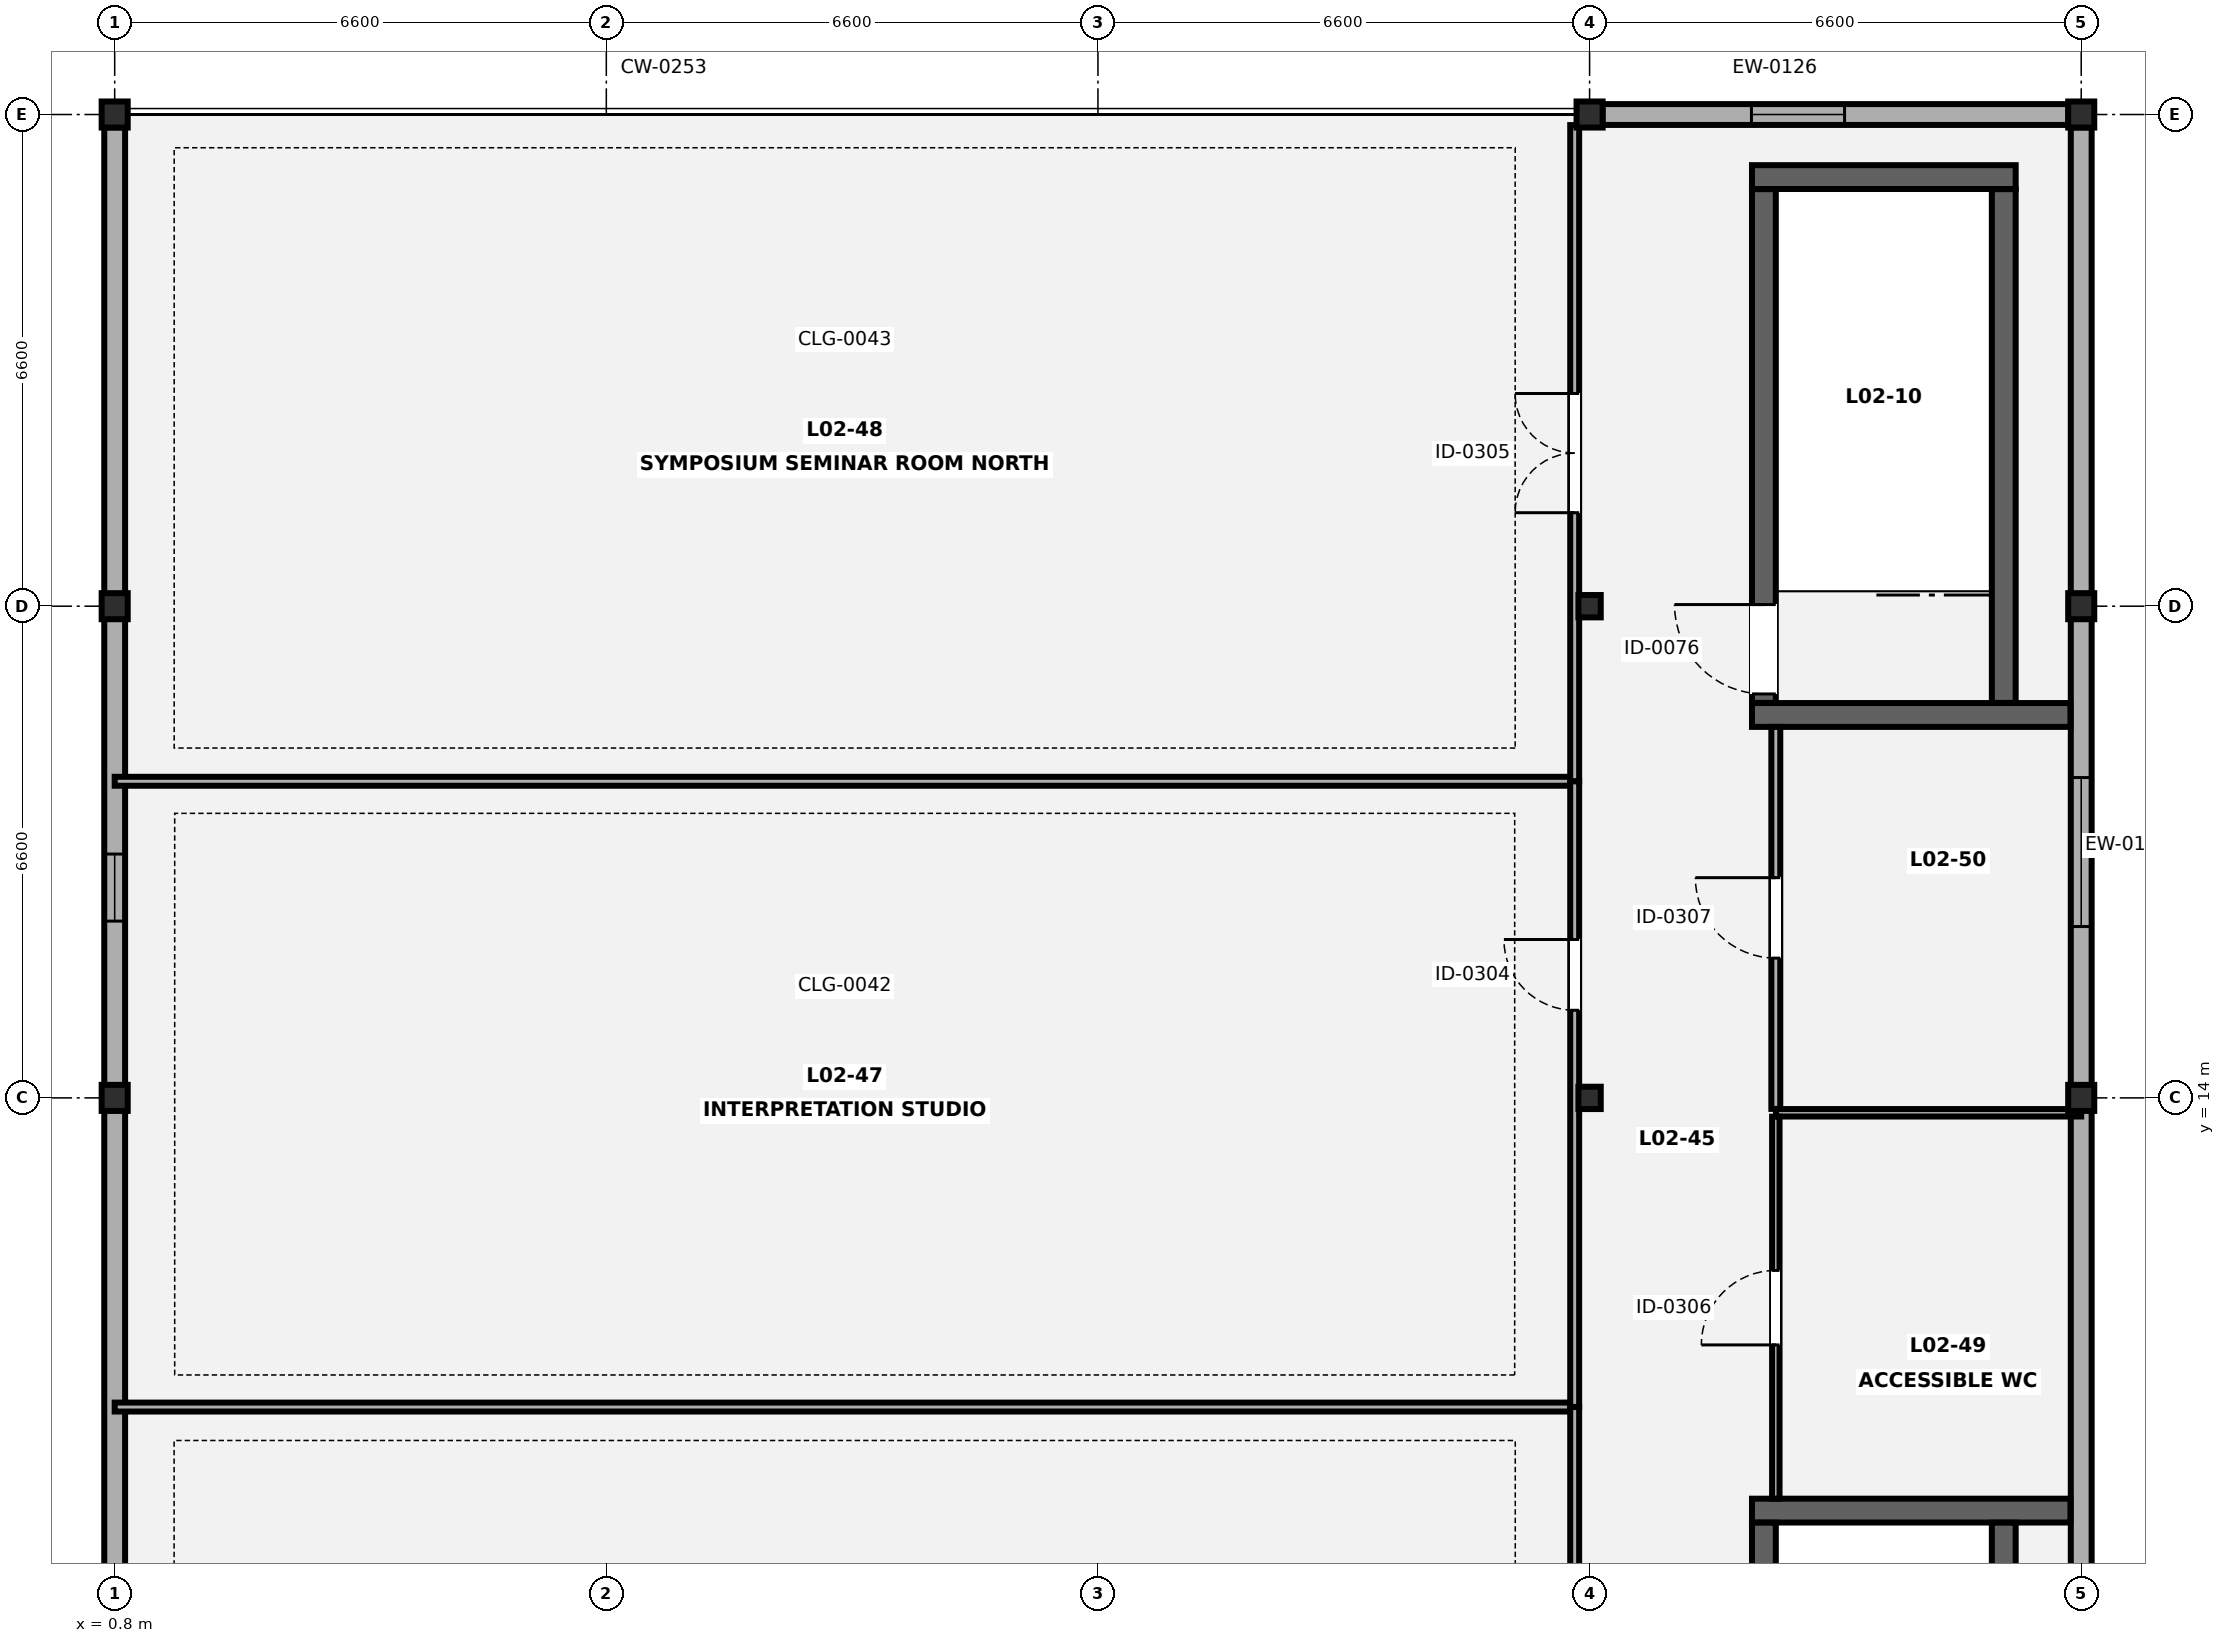
"""IFC4 building model, lengths in metres.
Left out: names, types, materials, properties, quantities, classifications, styles, units other than length and angle.
Written with IfcOpenShell. Run it as: python <this file> out.ifc"""

import sys

from ifc_helpers import new_model, si_unit, direction, frame, frame_2d, origin, origin_2d, place, context, subcontext, project, spatial, rectangle, hollow_rectangle, i_section, extrude, element, fill, save


model = new_model("IFC4")
c1 = context("Model", 3, precision=1e-05, world=origin(), true_north=direction((0.0, 1.0)))
c2 = subcontext(c1, "Body", "Model", "MODEL_VIEW")
j1 = project(units=[si_unit("LENGTHUNIT", "METRE"), si_unit("PLANEANGLEUNIT", "RADIAN")], contexts=[c1])
p1 = place(None, origin())
s1 = spatial("IfcSite", under=j1, at=p1, CompositionType="ELEMENT")
p2 = place(p1, origin())
s2 = spatial("IfcBuilding", under=s1, at=p2, CompositionType="ELEMENT")
p3 = place(p2, frame((0.0, 0.0, 9.1)))
s3 = spatial("IfcBuildingStorey", under=s2, at=p3, CompositionType="ELEMENT", Elevation=9.1)
for number, where, z_axis, x_axis in (
    (1, (0.8, 14.0, 0.0), (0.0, 0.0, 1.0), (1.0, 0.0, 0.0)),
    (2, (0.8, 20.6, 0.0), (0.0, 0.0, 1.0), (1.0, 0.0, 0.0)),
    (3, (0.8, 27.2, 0.0), (0.0, 0.0, 1.0), (1.0, 0.0, 0.0)),
):
    element("IfcColumn", number, at=place(p3, frame(where, z_axis=z_axis, x_axis=x_axis)), inside=s3, PredefinedType="COLUMN", context=c2, shape_type="SweptSolid", body=[
        extrude(i_section(OverallWidth=0.35, OverallDepth=0.35, WebThickness=0.02, FlangeThickness=0.032, FilletRadius=0.016, at=origin_2d()), origin(), (0.0, 0.0, 1.0), 3.95),
    ])
for number, where, z_axis, x_axis in (
    (4, (20.6, 14.0, 0.0), (0.0, 0.0, 1.0), (1.0, 0.0, 0.0)),
    (5, (20.6, 20.6, 0.0), (0.0, 0.0, 1.0), (1.0, 0.0, 0.0)),
):
    element("IfcColumn", number, at=place(p3, frame(where, z_axis=z_axis, x_axis=x_axis)), inside=s3, PredefinedType="COLUMN", context=c2, shape_type="SweptSolid", body=[
        extrude(hollow_rectangle(XDim=0.3, YDim=0.3, WallThickness=0.012, at=origin_2d()), origin(), (0.0, 0.0, 1.0), 3.95),
    ])
for number, where, z_axis, x_axis in (
    (6, (20.6, 27.2, 0.0), (0.0, 0.0, 1.0), (1.0, 0.0, 0.0)),
    (7, (27.2, 14.0, 0.0), (0.0, 0.0, 1.0), (1.0, 0.0, 0.0)),
    (8, (27.2, 20.6, 0.0), (0.0, 0.0, 1.0), (1.0, 0.0, 0.0)),
    (9, (27.2, 27.2, 0.0), (0.0, 0.0, 1.0), (1.0, 0.0, 0.0)),
):
    element("IfcColumn", number, at=place(p3, frame(where, z_axis=z_axis, x_axis=x_axis)), inside=s3, PredefinedType="COLUMN", context=c2, shape_type="SweptSolid", body=[
        extrude(i_section(OverallWidth=0.35, OverallDepth=0.35, WebThickness=0.02, FlangeThickness=0.032, FilletRadius=0.016, at=origin_2d()), origin(), (0.0, 0.0, 1.0), 3.95),
    ])
p4 = place(p3, frame((0.8, 0.973, 0.0), z_axis=(0.0, 0.0, 1.0), x_axis=(0.0, 1.0, 0.0)))
e10 = element("IfcWall", 10, at=p4, inside=s3, PredefinedType="SOLIDWALL", context=c2, shape_type="SweptSolid", body=[
    extrude(rectangle(XDim=26.054, YDim=0.28, at=frame_2d((13.027, 0.0))), origin(), (0.0, 0.0, 1.0), 3.445),
])
p5 = place(p4, frame((2.3, 0.0, 0.85)))
e11 = element("IfcOpeningElement", 11, at=p5, cuts=e10, PredefinedType="OPENING", context=c2, shape_type="SweptSolid", body=[
    extrude(rectangle(XDim=1.65, YDim=1.25, at=frame_2d((0.825, 0.625))), frame((0.0, 0.15, 0.0), z_axis=(0.0, -1.0, 0.0), x_axis=(1.0, 0.0, 0.0)), (0.0, 0.0, 1.0), 0.3),
])
p6 = place(p4, frame((15.4, 0.0, 0.85)))
e12 = element("IfcOpeningElement", 12, at=p6, cuts=e10, PredefinedType="OPENING", context=c2, shape_type="SweptSolid", body=[
    extrude(rectangle(XDim=0.9, YDim=1.35, at=frame_2d((0.45, 0.675))), frame((0.0, 0.15, 0.0), z_axis=(0.0, -1.0, 0.0), x_axis=(1.0, 0.0, 0.0)), (0.0, 0.0, 1.0), 0.3),
])
p7 = place(p3, frame((20.773, 27.2, 0.0), z_axis=(0.0, 0.0, 1.0), x_axis=(1.0, 0.0, 0.0)))
e13 = element("IfcWall", 13, at=p7, inside=s3, PredefinedType="SOLIDWALL", context=c2, shape_type="SweptSolid", body=[
    extrude(rectangle(XDim=6.254, YDim=0.28, at=frame_2d((3.127, 0.0))), origin(), (0.0, 0.0, 1.0), 3.505),
])
p8 = place(p7, frame((2.0, 0.0, 0.85)))
e14 = element("IfcOpeningElement", 14, at=p8, cuts=e13, PredefinedType="OPENING", context=c2, shape_type="SweptSolid", body=[
    extrude(rectangle(XDim=1.25, YDim=1.4, at=frame_2d((0.625, 0.7))), frame((0.0, 0.15, 0.0), z_axis=(0.0, -1.0, 0.0), x_axis=(1.0, 0.0, 0.0)), (0.0, 0.0, 1.0), 0.3),
])
p9 = place(p3, frame((27.2, 27.027, 0.0), z_axis=(0.0, 0.0, 1.0), x_axis=(0.0, -1.0, 0.0)))
e15 = element("IfcWall", 15, at=p9, inside=s3, PredefinedType="SOLIDWALL", context=c2, shape_type="SweptSolid", body=[
    extrude(rectangle(XDim=26.054, YDim=0.28, at=frame_2d((13.027, 0.0))), origin(), (0.0, 0.0, 1.0), 3.445),
])
p10 = place(p9, frame((8.727, 0.0, 0.85)))
e16 = element("IfcOpeningElement", 16, at=p10, cuts=e15, PredefinedType="OPENING", context=c2, shape_type="SweptSolid", body=[
    extrude(rectangle(XDim=2.0, YDim=1.4, at=frame_2d((1.0, 0.7))), frame((0.0, 0.15, 0.0), z_axis=(0.0, -1.0, 0.0), x_axis=(1.0, 0.0, 0.0)), (0.0, 0.0, 1.0), 0.3),
])
p11 = place(p3, frame((22.78, 8.46, 0.0), z_axis=(0.0, 0.0, 1.0), x_axis=(1.0, 0.0, 0.0)))
e17 = element("IfcWall", 17, at=p11, inside=s3, PredefinedType="SHEAR", context=c2, shape_type="SweptSolid", body=[
    extrude(rectangle(XDim=4.275, YDim=0.32, at=frame_2d((2.137, 0.0))), origin(), (0.0, 0.0, 1.0), 4.0),
])
p12 = place(p3, frame((22.94, 1.402, 0.0), z_axis=(0.0, 0.0, 1.0), x_axis=(0.0, 1.0, 0.0)))
e18 = element("IfcWall", 18, at=p12, inside=s3, PredefinedType="SHEAR", context=c2, shape_type="SweptSolid", body=[
    extrude(rectangle(XDim=6.896, YDim=0.32, at=frame_2d((3.448, 0.0))), origin(), (0.0, 0.0, 1.0), 4.0),
])
p13 = place(p12, frame((0.12, 0.0, 0.0)))
e19 = element("IfcOpeningElement", 19, at=p13, cuts=e18, PredefinedType="OPENING", context=c2, shape_type="SweptSolid", body=[
    extrude(rectangle(XDim=1.2, YDim=2.15, at=frame_2d((0.6, 1.075))), frame((0.0, 0.17, 0.0), z_axis=(0.0, -1.0, 0.0), x_axis=(1.0, 0.0, 0.0)), (0.0, 0.0, 1.0), 0.34),
])
p14 = place(p3, frame((26.16, 1.402, 0.0), z_axis=(0.0, 0.0, 1.0), x_axis=(0.0, 1.0, 0.0)))
e20 = element("IfcWall", 20, at=p14, inside=s3, PredefinedType="SHEAR", context=c2, shape_type="SweptSolid", body=[
    extrude(rectangle(XDim=6.896, YDim=0.32, at=frame_2d((3.448, 0.0))), origin(), (0.0, 0.0, 1.0), 4.0),
])
p15 = place(p3, frame((22.78, 19.14, 0.0), z_axis=(0.0, 0.0, 1.0), x_axis=(1.0, 0.0, 0.0)))
e21 = element("IfcWall", 21, at=p15, inside=s3, PredefinedType="SHEAR", context=c2, shape_type="SweptSolid", body=[
    extrude(rectangle(XDim=4.275, YDim=0.32, at=frame_2d((2.137, 0.0))), origin(), (0.0, 0.0, 1.0), 4.0),
])
p16 = place(p3, frame((22.78, 26.36, 0.0), z_axis=(0.0, 0.0, 1.0), x_axis=(1.0, 0.0, 0.0)))
e22 = element("IfcWall", 22, at=p16, inside=s3, PredefinedType="SHEAR", context=c2, shape_type="SweptSolid", body=[
    extrude(rectangle(XDim=3.54, YDim=0.32, at=frame_2d((1.77, 0.0))), origin(), (0.0, 0.0, 1.0), 4.0),
])
p17 = place(p3, frame((22.94, 19.302, 0.0), z_axis=(0.0, 0.0, 1.0), x_axis=(0.0, 1.0, 0.0)))
e23 = element("IfcWall", 23, at=p17, inside=s3, PredefinedType="SHEAR", context=c2, shape_type="SweptSolid", body=[
    extrude(rectangle(XDim=6.896, YDim=0.32, at=frame_2d((3.448, 0.0))), origin(), (0.0, 0.0, 1.0), 4.0),
])
p18 = place(p17, frame((0.12, 0.0, 0.0)))
e24 = element("IfcOpeningElement", 24, at=p18, cuts=e23, PredefinedType="OPENING", context=c2, shape_type="SweptSolid", body=[
    extrude(rectangle(XDim=1.2, YDim=2.15, at=frame_2d((0.6, 1.075))), frame((0.0, 0.17, 0.0), z_axis=(0.0, -1.0, 0.0), x_axis=(1.0, 0.0, 0.0)), (0.0, 0.0, 1.0), 0.34),
])
p19 = place(p3, frame((26.16, 19.302, 0.0), z_axis=(0.0, 0.0, 1.0), x_axis=(0.0, 1.0, 0.0)))
e25 = element("IfcWall", 25, at=p19, inside=s3, PredefinedType="SHEAR", context=c2, shape_type="SweptSolid", body=[
    extrude(rectangle(XDim=6.896, YDim=0.32, at=frame_2d((3.448, 0.0))), origin(), (0.0, 0.0, 1.0), 4.0),
])
p20 = place(p3, frame((0.8, 9.85, 0.0), z_axis=(0.0, 0.0, 1.0), x_axis=(1.0, 0.0, 0.0)))
e26 = element("IfcWall", 26, at=p20, inside=s3, PredefinedType="PARTITIONING", context=c2, shape_type="SweptSolid", body=[
    extrude(rectangle(XDim=19.6, YDim=0.12, at=frame_2d((9.8, 0.0))), origin(), (0.0, 0.0, 1.0), 3.98),
])
p21 = place(p3, frame((20.4, 0.8, 0.0), z_axis=(0.0, 0.0, 1.0), x_axis=(0.0, 1.0, 0.0)))
e27 = element("IfcWall", 27, at=p21, inside=s3, PredefinedType="PARTITIONING", context=c2, shape_type="SweptSolid", body=[
    extrude(rectangle(XDim=9.05, YDim=0.12, at=frame_2d((4.525, 0.0))), origin(), (0.0, 0.0, 1.0), 3.445),
])
p22 = place(p21, frame((3.725, 0.0, 0.0)))
e28 = element("IfcOpeningElement", 28, at=p22, cuts=e27, PredefinedType="OPENING", context=c2, shape_type="SweptSolid", body=[
    extrude(rectangle(XDim=1.6, YDim=2.18, at=frame_2d((0.8, 1.09))), frame((0.0, 0.07, 0.0), z_axis=(0.0, -1.0, 0.0), x_axis=(1.0, 0.0, 0.0)), (0.0, 0.0, 1.0), 0.14),
])
p23 = place(p3, frame((0.8, 18.25, 0.0), z_axis=(0.0, 0.0, 1.0), x_axis=(1.0, 0.0, 0.0)))
e29 = element("IfcWall", 29, at=p23, inside=s3, PredefinedType="PARTITIONING", context=c2, shape_type="SweptSolid", body=[
    extrude(rectangle(XDim=19.6, YDim=0.12, at=frame_2d((9.8, 0.0))), origin(), (0.0, 0.0, 1.0), 3.98),
])
p24 = place(p3, frame((20.4, 9.852, 0.0), z_axis=(0.0, 0.0, 1.0), x_axis=(0.0, 1.0, 0.0)))
e30 = element("IfcWall", 30, at=p24, inside=s3, PredefinedType="PARTITIONING", context=c2, shape_type="SweptSolid", body=[
    extrude(rectangle(XDim=8.398, YDim=0.12, at=frame_2d((4.199, 0.0))), origin(), (0.0, 0.0, 1.0), 3.445),
])
p25 = place(p24, frame((5.324, 0.0, 0.0)))
e31 = element("IfcOpeningElement", 31, at=p25, cuts=e30, PredefinedType="OPENING", context=c2, shape_type="SweptSolid", body=[
    extrude(rectangle(XDim=0.95, YDim=2.1, at=frame_2d((0.475, 1.05))), frame((0.0, 0.07, 0.0), z_axis=(0.0, -1.0, 0.0), x_axis=(1.0, 0.0, 0.0)), (0.0, 0.0, 1.0), 0.14),
])
p26 = place(p3, frame((20.4, 18.252, 0.0), z_axis=(0.0, 0.0, 1.0), x_axis=(0.0, 1.0, 0.0)))
e32 = element("IfcWall", 32, at=p26, inside=s3, PredefinedType="PARTITIONING", context=c2, shape_type="SweptSolid", body=[
    extrude(rectangle(XDim=8.806, YDim=0.12, at=frame_2d((4.403, 0.0))), origin(), (0.0, 0.0, 1.0), 3.445),
])
p27 = place(p26, frame((3.603, 0.0, 0.0)))
e33 = element("IfcOpeningElement", 33, at=p27, cuts=e32, PredefinedType="OPENING", context=c2, shape_type="SweptSolid", body=[
    extrude(rectangle(XDim=1.6, YDim=2.18, at=frame_2d((0.8, 1.09))), frame((0.0, 0.07, 0.0), z_axis=(0.0, -1.0, 0.0), x_axis=(1.0, 0.0, 0.0)), (0.0, 0.0, 1.0), 0.14),
])
p28 = place(p3, frame((23.102, 13.8, 0.0), z_axis=(0.0, 0.0, 1.0), x_axis=(1.0, 0.0, 0.0)))
e34 = element("IfcWall", 34, at=p28, inside=s3, PredefinedType="PARTITIONING", context=c2, shape_type="SweptSolid", body=[
    extrude(rectangle(XDim=4.098, YDim=0.1, at=frame_2d((2.049, 0.0))), origin(), (0.0, 0.0, 1.0), 2.997),
])
p29 = place(p3, frame((23.1, 8.62, 0.0), z_axis=(0.0, 0.0, 1.0), x_axis=(0.0, 1.0, 0.0)))
e35 = element("IfcWall", 35, at=p29, inside=s3, PredefinedType="PARTITIONING", context=c2, shape_type="SweptSolid", body=[
    extrude(rectangle(XDim=5.128, YDim=0.1, at=frame_2d((2.564, 0.0))), origin(), (0.0, 0.0, 1.0), 3.98),
])
p30 = place(p29, frame((2.064, 0.0, 0.0)))
e36 = element("IfcOpeningElement", 36, at=p30, cuts=e35, PredefinedType="OPENING", context=c2, shape_type="SweptSolid", body=[
    extrude(rectangle(XDim=1.0, YDim=2.1, at=frame_2d((0.5, 1.05))), frame((0.0, 0.06, 0.0), z_axis=(0.0, -1.0, 0.0), x_axis=(1.0, 0.0, 0.0)), (0.0, 0.0, 1.0), 0.12),
])
p31 = place(p3, frame((23.1, 13.852, 0.0), z_axis=(0.0, 0.0, 1.0), x_axis=(0.0, 1.0, 0.0)))
e37 = element("IfcWall", 37, at=p31, inside=s3, PredefinedType="PARTITIONING", context=c2, shape_type="SweptSolid", body=[
    extrude(rectangle(XDim=5.128, YDim=0.12, at=frame_2d((2.564, 0.0))), origin(), (0.0, 0.0, 1.0), 3.98),
])
p32 = place(p31, frame((2.024, 0.0, 0.0)))
e38 = element("IfcOpeningElement", 38, at=p32, cuts=e37, PredefinedType="OPENING", context=c2, shape_type="SweptSolid", body=[
    extrude(rectangle(XDim=1.08, YDim=2.12, at=frame_2d((0.54, 1.06))), frame((0.0, 0.07, 0.0), z_axis=(0.0, -1.0, 0.0), x_axis=(1.0, 0.0, 0.0)), (0.0, 0.0, 1.0), 0.14),
])
p33 = place(p6, origin())
e39 = element("IfcWindow", 39, at=p33, inside=s3, PartitioningType="SINGLE_PANEL", PredefinedType="WINDOW", context=c2, shape_type="SweptSolid", body=[
    extrude(rectangle(XDim=0.9, YDim=1.35, at=frame_2d((0.45, 0.675))), frame((0.0, 0.03, 0.0), z_axis=(0.0, -1.0, 0.0), x_axis=(1.0, 0.0, 0.0)), (0.0, 0.0, 1.0), 0.06),
])
fill(e12, e39)
p34 = place(p8, origin())
e40 = element("IfcWindow", 40, at=p34, inside=s3, PartitioningType="SINGLE_PANEL", PredefinedType="WINDOW", context=c2, shape_type="SweptSolid", body=[
    extrude(rectangle(XDim=1.25, YDim=1.4, at=frame_2d((0.625, 0.7))), frame((0.0, 0.03, 0.0), z_axis=(0.0, -1.0, 0.0), x_axis=(1.0, 0.0, 0.0)), (0.0, 0.0, 1.0), 0.06),
])
fill(e14, e40)
p35 = place(p10, origin())
e41 = element("IfcWindow", 41, at=p35, inside=s3, PartitioningType="SINGLE_PANEL", PredefinedType="WINDOW", context=c2, shape_type="SweptSolid", body=[
    extrude(rectangle(XDim=2.0, YDim=1.4, at=frame_2d((1.0, 0.7))), frame((0.0, 0.03, 0.0), z_axis=(0.0, -1.0, 0.0), x_axis=(1.0, 0.0, 0.0)), (0.0, 0.0, 1.0), 0.06),
])
fill(e16, e41)
p36 = place(p18, origin())
e42 = element("IfcDoor", 42, at=p36, inside=s3, OperationType="SINGLE_SWING_RIGHT", PredefinedType="DOOR", context=c2, shape_type="SweptSolid", body=[
    extrude(rectangle(XDim=1.2, YDim=2.15, at=frame_2d((0.6, 1.075))), frame((0.0, 0.025, 0.0), z_axis=(0.0, -1.0, 0.0), x_axis=(1.0, 0.0, 0.0)), (0.0, 0.0, 1.0), 0.05),
])
fill(e24, e42)
p37 = place(p25, origin())
e43 = element("IfcDoor", 43, at=p37, inside=s3, OperationType="SINGLE_SWING_RIGHT", PredefinedType="DOOR", context=c2, shape_type="SweptSolid", body=[
    extrude(rectangle(XDim=0.95, YDim=2.1, at=frame_2d((0.475, 1.05))), frame((0.0, 0.025, 0.0), z_axis=(0.0, -1.0, 0.0), x_axis=(1.0, 0.0, 0.0)), (0.0, 0.0, 1.0), 0.05),
])
fill(e31, e43)
p38 = place(p27, origin())
e44 = element("IfcDoor", 44, at=p38, inside=s3, OperationType="DOUBLE_DOOR_SINGLE_SWING", PredefinedType="DOOR", context=c2, shape_type="SweptSolid", body=[
    extrude(rectangle(XDim=1.6, YDim=2.18, at=frame_2d((0.8, 1.09))), frame((0.0, 0.025, 0.0), z_axis=(0.0, -1.0, 0.0), x_axis=(1.0, 0.0, 0.0)), (0.0, 0.0, 1.0), 0.05),
])
fill(e33, e44)
p39 = place(p30, origin())
e45 = element("IfcDoor", 45, at=p39, inside=s3, OperationType="SINGLE_SWING_LEFT", PredefinedType="DOOR", context=c2, shape_type="SweptSolid", body=[
    extrude(rectangle(XDim=1.0, YDim=2.1, at=frame_2d((0.5, 1.05))), frame((0.0, 0.025, 0.0), z_axis=(0.0, -1.0, 0.0), x_axis=(1.0, 0.0, 0.0)), (0.0, 0.0, 1.0), 0.05),
])
fill(e36, e45)
p40 = place(p32, origin())
e46 = element("IfcDoor", 46, at=p40, inside=s3, OperationType="SINGLE_SWING_RIGHT", PredefinedType="DOOR", context=c2, shape_type="SweptSolid", body=[
    extrude(rectangle(XDim=1.08, YDim=2.12, at=frame_2d((0.54, 1.06))), frame((0.0, 0.025, 0.0), z_axis=(0.0, -1.0, 0.0), x_axis=(1.0, 0.0, 0.0)), (0.0, 0.0, 1.0), 0.05),
])
fill(e38, e46)
save(model, sys.argv[1])
